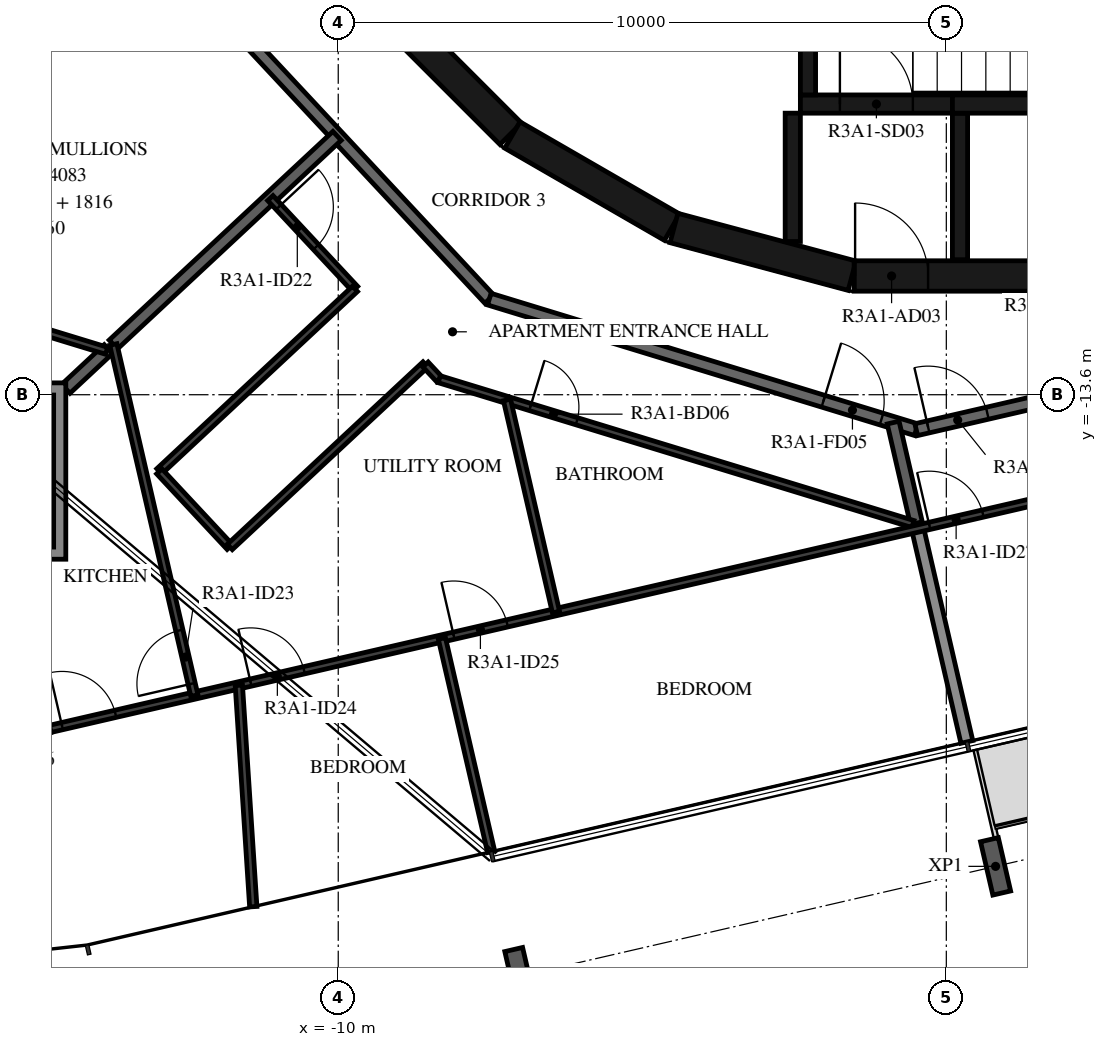
"""IFC4 building model, lengths in metres.
Left out: names, types, materials, properties, quantities, classifications, styles, units other than length and angle.
Written with IfcOpenShell. Run it as: python <this file> out.ifc"""

import sys

from ifc_helpers import new_model, si_unit, direction, frame, frame_2d, origin, origin_2d, place, context, subcontext, project, spatial, polyline, rectangle, i_section, outline, extrude, element, fill, save


model = new_model("IFC4")
c1 = context("Model", 3, precision=1e-05, world=origin(), true_north=direction((0.0, 1.0)))
c2 = subcontext(c1, "Body", "Model", "MODEL_VIEW")
j1 = project(units=[si_unit("LENGTHUNIT", "METRE"), si_unit("PLANEANGLEUNIT", "RADIAN")], contexts=[c1])
p1 = place(None, origin())
s1 = spatial("IfcSite", under=j1, at=p1, CompositionType="ELEMENT")
p2 = place(p1, origin())
s2 = spatial("IfcBuilding", under=s1, at=p2, CompositionType="ELEMENT")
p3 = place(p2, frame((0.0, 0.0, 116.9)))
s3 = spatial("IfcBuildingStorey", under=s2, at=p3, CompositionType="ELEMENT", Elevation=116.9)
for number, where, z_axis, x_axis in (
    (1, (-7.013, -23.162, -0.38), (0.0, 0.0, 1.0), (-0.974, -0.225, 0.0)),
    (2, (0.81, -21.356, -0.38), (0.0, 0.0, 1.0), (-0.974, -0.225, 0.0)),
):
    element("IfcColumn", number, at=place(p3, frame(where, z_axis=z_axis, x_axis=x_axis)), inside=s3, PredefinedType="COLUMN", context=c2, shape_type="SweptSolid", body=[
        extrude(i_section(OverallWidth=0.3, OverallDepth=0.9, WebThickness=0.019, FlangeThickness=0.035, FilletRadius=0.03, at=origin_2d()), origin(), (0.0, 0.0, 1.0), 3.5),
    ])
p4 = place(p3, frame((-9.308, -7.164, 0.0), z_axis=(0.0, 0.0, 1.0), x_axis=(0.707106781187, -0.707106781187, 0.0)))
e3 = element("IfcWall", 3, at=p4, inside=s3, PredefinedType="SHEAR", context=c2, shape_type="SweptSolid", body=[
    extrude(rectangle(XDim=3.032, YDim=0.5, at=frame_2d((1.516, 0.0))), origin(), (0.0, 0.0, 1.0), 3.12),
])
for number, where, z_axis, x_axis in (
    (4, (-7.137, -9.329, 0.0), (0.0, 0.0, 1.0), (0.866, -0.5, 0.0)),
    (5, (-4.479, -10.858, 0.0), (0.0, 0.0, 1.0), (0.966, -0.259, 0.0)),
):
    element("IfcWall", number, at=place(p3, frame(where, z_axis=z_axis, x_axis=x_axis)), inside=s3, PredefinedType="SHEAR", context=c2, shape_type="SweptSolid", body=[
        extrude(rectangle(XDim=3.033, YDim=0.5, at=frame_2d((1.516, 0.0))), origin(), (0.0, 0.0, 1.0), 3.12),
    ])
p5 = place(p3, frame((-1.516, -11.647, 0.0), z_axis=(0.0, 0.0, 1.0), x_axis=(1.0, 0.0, 0.0)))
e6 = element("IfcWall", 6, at=p5, inside=s3, PredefinedType="SHEAR", context=c2, shape_type="SweptSolid", body=[
    extrude(rectangle(XDim=3.033, YDim=0.5, at=frame_2d((1.516, 0.0))), origin(), (0.0, 0.0, 1.0), 3.12),
])
p6 = place(p5, frame((0.016, 0.0, 0.0)))
e7 = element("IfcOpeningElement", 7, at=p6, cuts=e6, PredefinedType="OPENING", context=c2, shape_type="SweptSolid", body=[
    extrude(rectangle(XDim=1.2, YDim=2.1, at=frame_2d((0.6, 1.05))), frame((0.0, 0.26, 0.0), z_axis=(0.0, -1.0, 0.0), x_axis=(1.0, 0.0, 0.0)), (0.0, 0.0, 1.0), 0.52),
])
p7 = place(p3, frame((-2.275, -8.67, 0.0), z_axis=(0.0, 0.0, 1.0), x_axis=(0.0, 1.0, 0.0)))
e8 = element("IfcWall", 8, at=p7, inside=s3, PredefinedType="SHEAR", context=c2, shape_type="SweptSolid", body=[
    extrude(rectangle(XDim=3.32, YDim=0.25, at=frame_2d((1.66, 0.0))), origin(), (0.0, 0.0, 1.0), 3.12),
])
p8 = place(p3, frame((0.1, -8.82, 0.0), z_axis=(0.0, 0.0, 1.0), x_axis=(1.0, 0.0, 0.0)))
e9 = element("IfcWall", 9, at=p8, inside=s3, PredefinedType="SHEAR", context=c2, shape_type="SweptSolid", body=[
    extrude(rectangle(XDim=4.55, YDim=0.3, at=frame_2d((2.275, 0.0))), origin(), (0.0, 0.0, 1.0), 3.12),
])
p9 = place(p3, frame((-2.4, -8.82, 0.0), z_axis=(0.0, 0.0, 1.0), x_axis=(1.0, 0.0, 0.0)))
e10 = element("IfcWall", 10, at=p9, inside=s3, PredefinedType="SHEAR", context=c2, shape_type="SweptSolid", body=[
    extrude(rectangle(XDim=2.5, YDim=0.3, at=frame_2d((1.25, 0.0))), origin(), (0.0, 0.0, 1.0), 3.12),
])
p10 = place(p9, frame((0.65, 0.0, 0.0)))
e11 = element("IfcOpeningElement", 11, at=p10, cuts=e10, PredefinedType="OPENING", context=c2, shape_type="SweptSolid", body=[
    extrude(rectangle(XDim=1.2, YDim=2.1, at=frame_2d((0.6, 1.05))), frame((0.0, 0.16, 0.0), z_axis=(0.0, -1.0, 0.0), x_axis=(1.0, 0.0, 0.0)), (0.0, 0.0, 1.0), 0.32),
])
p11 = place(p3, frame((-2.525, -8.97, 0.0), z_axis=(0.0, 0.0, 1.0), x_axis=(0.0, -1.0, 0.0)))
e12 = element("IfcWall", 12, at=p11, inside=s3, PredefinedType="SHEAR", context=c2, shape_type="SweptSolid", body=[
    extrude(rectangle(XDim=2.11, YDim=0.25, at=frame_2d((1.055, 0.0))), origin(), (0.0, 0.0, 1.0), 3.12),
])
p12 = place(p3, frame((0.225, -8.97, 0.0), z_axis=(0.0, 0.0, 1.0), x_axis=(0.0, -1.0, 0.0)))
e13 = element("IfcWall", 13, at=p12, inside=s3, PredefinedType="SHEAR", context=c2, shape_type="SweptSolid", body=[
    extrude(rectangle(XDim=2.41, YDim=0.25, at=frame_2d((1.205, 0.0))), origin(), (0.0, 0.0, 1.0), 3.12),
])
p13 = place(p3, frame((-12.523, -6.659, 0.0), z_axis=(0.0, 0.0, 1.0), x_axis=(0.682001841105, -0.731350455479, 0.0)))
e14 = element("IfcWall", 14, at=p13, inside=s3, PredefinedType="STANDARD", context=c2, shape_type="SweptSolid", body=[
    extrude(rectangle(XDim=7.342, YDim=0.2, at=frame_2d((3.671, 0.0))), origin(), (0.0, 0.0, 1.0), 3.12),
])
p14 = place(p3, frame((-7.516, -12.028, 0.0), z_axis=(0.0, 0.0, 1.0), x_axis=(0.956306642771, -0.292365533182, 0.0)))
e15 = element("IfcWall", 15, at=p14, inside=s3, PredefinedType="STANDARD", context=c2, shape_type="SweptSolid", body=[
    extrude(rectangle(XDim=7.342, YDim=0.2, at=frame_2d((3.671, 0.0))), origin(), (0.0, 0.0, 1.0), 3.12),
])
p15 = place(p14, frame((5.745, 0.0, 0.0)))
e16 = element("IfcOpeningElement", 16, at=p15, cuts=e15, PredefinedType="OPENING", context=c2, shape_type="SweptSolid", body=[
    extrude(rectangle(XDim=1.0, YDim=2.1, at=frame_2d((0.5, 1.05))), frame((0.0, 0.11, 0.0), z_axis=(0.0, -1.0, 0.0), x_axis=(1.0, 0.0, 0.0)), (0.0, 0.0, 1.0), 0.22),
])
p16 = place(p3, frame((-0.495, -14.175, 0.0), z_axis=(0.0, 0.0, 1.0), x_axis=(0.974376622151, 0.224922649383, 0.0)))
e17 = element("IfcWall", 17, at=p16, inside=s3, PredefinedType="STANDARD", context=c2, shape_type="SweptSolid", body=[
    extrude(rectangle(XDim=7.342, YDim=0.2, at=frame_2d((3.671, 0.0))), origin(), (0.0, 0.0, 1.0), 3.12),
])
p17 = place(p16, frame((0.2, 0.0, 0.0)))
e18 = element("IfcOpeningElement", 18, at=p17, cuts=e17, PredefinedType="OPENING", context=c2, shape_type="SweptSolid", body=[
    extrude(rectangle(XDim=1.0, YDim=2.1, at=frame_2d((0.5, 1.05))), frame((0.0, 0.11, 0.0), z_axis=(0.0, -1.0, 0.0), x_axis=(1.0, 0.0, 0.0)), (0.0, 0.0, 1.0), 0.22),
])
p18 = place(p3, frame((-13.699, -12.774, 0.0), z_axis=(0.0, 0.0, 1.0), x_axis=(0.731353758457, 0.681998299111, 0.0)))
e19 = element("IfcWall", 19, at=p18, inside=s3, PredefinedType="STANDARD", context=c2, shape_type="SweptSolid", body=[
    extrude(rectangle(XDim=5.031, YDim=0.2, at=frame_2d((2.515, 0.0))), origin(), (0.0, 0.0, 1.0), 3.12),
])
p19 = place(p3, frame((-14.48, -13.503, 0.0), z_axis=(0.0, 0.0, 1.0), x_axis=(0.73152991834, 0.681809341806, 0.0)))
e20 = element("IfcWall", 20, at=p19, inside=s3, PredefinedType="STANDARD", context=c2, shape_type="SweptSolid", body=[
    extrude(rectangle(XDim=0.958, YDim=0.2, at=frame_2d((0.479, 0.0))), origin(), (0.0, 0.0, 1.0), 3.12),
])
p20 = place(p3, frame((-0.492, -15.713, 0.0), z_axis=(0.0, 0.0, 1.0), x_axis=(-0.224974992875, 0.97436453783, 0.0)))
e21 = element("IfcWall", 21, at=p20, inside=s3, PredefinedType="STANDARD", context=c2, shape_type="SweptSolid", body=[
    extrude(rectangle(XDim=1.698, YDim=0.2, at=frame_2d((0.849, 0.0))), origin(), (0.0, 0.0, 1.0), 3.12),
])
p21 = place(p3, frame((0.338, -19.31, 0.0), z_axis=(0.0, 0.0, 1.0), x_axis=(-0.224943703639, 0.9743717618, 0.0)))
e22 = element("IfcWall", 22, at=p21, inside=s3, PredefinedType="STANDARD", context=c2, shape_type="SweptSolid", body=[
    extrude(rectangle(XDim=3.6, YDim=0.2, at=frame_2d((1.8, 0.0))), origin(), (0.0, 0.0, 1.0), 2.73),
])
p22 = place(p3, frame((-19.404, -11.167, 0.0), z_axis=(0.0, 0.0, 1.0), x_axis=(0.956314306829, -0.292340463423, 0.0)))
e23 = element("IfcWall", 23, at=p22, inside=s3, PredefinedType="PARTITIONING", context=c2, shape_type="SweptSolid", body=[
    extrude(rectangle(XDim=5.85, YDim=0.12, at=frame_2d((2.925, 0.0))), origin(), (0.0, 0.0, 1.0), 3.12),
])
p23 = place(p22, frame((0.3, 0.0, 0.0)))
e24 = element("IfcOpeningElement", 24, at=p23, cuts=e23, PredefinedType="OPENING", context=c2, shape_type="SweptSolid", body=[
    extrude(rectangle(XDim=0.9, YDim=2.1, at=frame_2d((0.45, 1.05))), frame((0.0, 0.07, 0.0), z_axis=(0.0, -1.0, 0.0), x_axis=(1.0, 0.0, 0.0)), (0.0, 0.0, 1.0), 0.14),
])
p24 = place(p3, frame((-11.117, -10.366, 0.0), z_axis=(0.0, 0.0, 1.0), x_axis=(0.682041233274, -0.731313719353, 0.0)))
e25 = element("IfcWall", 25, at=p24, inside=s3, PredefinedType="PARTITIONING", context=c2, shape_type="SweptSolid", body=[
    extrude(rectangle(XDim=2.042, YDim=0.12, at=frame_2d((1.021, 0.0))), origin(), (0.0, 0.0, 1.0), 3.12),
])
p25 = place(p24, frame((0.2, 0.0, 0.0)))
e26 = element("IfcOpeningElement", 26, at=p25, cuts=e25, PredefinedType="OPENING", context=c2, shape_type="SweptSolid", body=[
    extrude(rectangle(XDim=0.9, YDim=2.1, at=frame_2d((0.45, 1.05))), frame((0.0, 0.07, 0.0), z_axis=(0.0, -1.0, 0.0), x_axis=(1.0, 0.0, 0.0)), (0.0, 0.0, 1.0), 0.14),
])
p26 = place(p3, frame((-9.724, -11.859, 0.0), z_axis=(0.0, 0.0, 1.0), x_axis=(-0.731365154613, -0.681986078023, 0.0)))
e27 = element("IfcWall", 27, at=p26, inside=s3, PredefinedType="PARTITIONING", context=c2, shape_type="SweptSolid", body=[
    extrude(rectangle(XDim=4.4, YDim=0.12, at=frame_2d((2.2, 0.0))), origin(), (0.0, 0.0, 1.0), 3.12),
])
p27 = place(p3, frame((-12.943, -14.86, 0.0), z_axis=(0.0, 0.0, 1.0), x_axis=(0.682046998737, -0.731308342297, 0.0)))
e28 = element("IfcWall", 28, at=p27, inside=s3, PredefinedType="PARTITIONING", context=c2, shape_type="SweptSolid", body=[
    extrude(rectangle(XDim=1.7, YDim=0.12, at=frame_2d((0.85, 0.0))), origin(), (0.0, 0.0, 1.0), 3.12),
])
p28 = place(p3, frame((-11.783, -16.104, 0.0), z_axis=(0.0, 0.0, 1.0), x_axis=(0.731365154613, 0.681986078023, 0.0)))
e29 = element("IfcWall", 29, at=p28, inside=s3, PredefinedType="PARTITIONING", context=c2, shape_type="SweptSolid", body=[
    extrude(rectangle(XDim=4.4, YDim=0.12, at=frame_2d((2.2, 0.0))), origin(), (0.0, 0.0, 1.0), 3.12),
])
p29 = place(p3, frame((-8.565, -13.103, 0.0), z_axis=(0.0, 0.0, 1.0), x_axis=(0.681636048219, -0.731691395172, 0.0)))
e30 = element("IfcWall", 30, at=p29, inside=s3, PredefinedType="PARTITIONING", context=c2, shape_type="SweptSolid", body=[
    extrude(rectangle(XDim=0.332, YDim=0.12, at=frame_2d((0.166, 0.0))), origin(), (0.0, 0.0, 1.0), 3.12),
])
p30 = place(p3, frame((-8.339, -13.345, 0.0), z_axis=(0.0, 0.0, 1.0), x_axis=(0.956310145342, -0.292354076276, 0.0)))
e31 = element("IfcWall", 31, at=p30, inside=s3, PredefinedType="PARTITIONING", context=c2, shape_type="SweptSolid", body=[
    extrude(rectangle(XDim=8.146, YDim=0.12, at=frame_2d((4.073, 0.0))), origin(), (0.0, 0.0, 1.0), 3.12),
])
p31 = place(p30, frame((1.565, 0.0, 0.0)))
e32 = element("IfcOpeningElement", 32, at=p31, cuts=e31, PredefinedType="OPENING", context=c2, shape_type="SweptSolid", body=[
    extrude(rectangle(XDim=0.8, YDim=2.1, at=frame_2d((0.4, 1.05))), frame((0.0, 0.07, 0.0), z_axis=(0.0, -1.0, 0.0), x_axis=(1.0, 0.0, 0.0)), (0.0, 0.0, 1.0), 0.14),
])
p32 = place(p3, frame((-14.736, -19.095, 0.0), z_axis=(0.0, 0.0, 1.0), x_axis=(0.974369132722, 0.224955091516, 0.0)))
e33 = element("IfcWall", 33, at=p32, inside=s3, PredefinedType="PARTITIONING", context=c2, shape_type="SweptSolid", body=[
    extrude(rectangle(XDim=18.654, YDim=0.12, at=frame_2d((9.327, 0.0))), origin(), (0.0, 0.0, 1.0), 3.12),
])
p33 = place(p32, frame((3.383, 0.0, 0.0)))
e34 = element("IfcOpeningElement", 34, at=p33, cuts=e33, PredefinedType="OPENING", context=c2, shape_type="SweptSolid", body=[
    extrude(rectangle(XDim=0.9, YDim=2.1, at=frame_2d((0.45, 1.05))), frame((0.0, 0.07, 0.0), z_axis=(0.0, -1.0, 0.0), x_axis=(1.0, 0.0, 0.0)), (0.0, 0.0, 1.0), 0.14),
])
p34 = place(p32, frame((6.81, 0.0, 0.0)))
e35 = element("IfcOpeningElement", 35, at=p34, cuts=e33, PredefinedType="OPENING", context=c2, shape_type="SweptSolid", body=[
    extrude(rectangle(XDim=0.9, YDim=2.1, at=frame_2d((0.45, 1.05))), frame((0.0, 0.07, 0.0), z_axis=(0.0, -1.0, 0.0), x_axis=(1.0, 0.0, 0.0)), (0.0, 0.0, 1.0), 0.14),
])
p35 = place(p32, frame((0.2, 0.0, 0.0)))
e36 = element("IfcOpeningElement", 36, at=p35, cuts=e33, PredefinedType="OPENING", context=c2, shape_type="SweptSolid", body=[
    extrude(rectangle(XDim=0.9, YDim=2.1, at=frame_2d((0.45, 1.05))), frame((0.0, 0.07, 0.0), z_axis=(0.0, -1.0, 0.0), x_axis=(1.0, 0.0, 0.0)), (0.0, 0.0, 1.0), 0.14),
])
p36 = place(p32, frame((14.839, 0.0, 0.0)))
e37 = element("IfcOpeningElement", 37, at=p36, cuts=e33, PredefinedType="OPENING", context=c2, shape_type="SweptSolid", body=[
    extrude(rectangle(XDim=0.9, YDim=2.1, at=frame_2d((0.45, 1.05))), frame((0.0, 0.07, 0.0), z_axis=(0.0, -1.0, 0.0), x_axis=(1.0, 0.0, 0.0)), (0.0, 0.0, 1.0), 0.14),
])
p37 = place(p3, frame((-12.366, -18.548, 0.0), z_axis=(0.0, 0.0, 1.0), x_axis=(-0.224958805164, 0.974368275335, 0.0)))
e38 = element("IfcWall", 38, at=p37, inside=s3, PredefinedType="PARTITIONING", context=c2, shape_type="SweptSolid", body=[
    extrude(rectangle(XDim=5.926, YDim=0.12, at=frame_2d((2.963, 0.0))), origin(), (0.0, 0.0, 1.0), 3.12),
])
p38 = place(p37, frame((0.2, 0.0, 0.0)))
e39 = element("IfcOpeningElement", 39, at=p38, cuts=e38, PredefinedType="OPENING", context=c2, shape_type="SweptSolid", body=[
    extrude(rectangle(XDim=0.9, YDim=2.1, at=frame_2d((0.45, 1.05))), frame((0.0, 0.07, 0.0), z_axis=(0.0, -1.0, 0.0), x_axis=(1.0, 0.0, 0.0)), (0.0, 0.0, 1.0), 0.14),
])
p39 = place(p3, frame((-11.397, -22.019, 0.0), z_axis=(0.0, 0.0, 1.0), x_axis=(-0.065124052048, 0.997877175731, 0.0)))
e40 = element("IfcWall", 40, at=p39, inside=s3, PredefinedType="PARTITIONING", context=c2, shape_type="SweptSolid", body=[
    extrude(rectangle(XDim=3.648, YDim=0.12, at=frame_2d((1.824, 0.0))), origin(), (0.0, 0.0, 1.0), 3.12),
])
p40 = place(p3, frame((-6.419, -17.175, 0.0), z_axis=(0.0, 0.0, 1.0), x_axis=(-0.224979003559, 0.974363611778, 0.0)))
e41 = element("IfcWall", 41, at=p40, inside=s3, PredefinedType="PARTITIONING", context=c2, shape_type="SweptSolid", body=[
    extrude(rectangle(XDim=3.581, YDim=0.12, at=frame_2d((1.791, 0.0))), origin(), (0.0, 0.0, 1.0), 3.12),
])
p41 = place(p3, frame((-7.486, -21.116, 0.0), z_axis=(0.0, 0.0, 1.0), x_axis=(-0.224943703639, 0.9743717618, 0.0)))
e42 = element("IfcWall", 42, at=p41, inside=s3, PredefinedType="PARTITIONING", context=c2, shape_type="SweptSolid", body=[
    extrude(rectangle(XDim=3.6, YDim=0.12, at=frame_2d((1.8, 0.0))), origin(), (0.0, 0.0, 1.0), 2.73),
])
p42 = place(p3, origin())
e43 = element("IfcWall", 43, at=p42, inside=s3, PredefinedType="STANDARD", context=c2, shape_type="SweptSolid", body=[
    extrude(outline(polyline([(-14.48, -13.405), (-14.48, -16.305), (-17.38, -16.305), (-17.38, -13.405), (-14.48, -13.405)]), holes=[polyline([(-17.18, -16.105), (-14.68, -16.105), (-14.68, -13.605), (-17.18, -13.605), (-17.18, -16.105)])]), origin(), (0.0, 0.0, 1.0), 3.12),
])
p43 = place(p10, origin())
e44 = element("IfcDoor", 44, at=p43, inside=s3, OperationType="SINGLE_SWING_LEFT", PredefinedType="DOOR", context=c2, shape_type="SweptSolid", body=[
    extrude(rectangle(XDim=1.2, YDim=2.1, at=frame_2d((0.6, 1.05))), frame((0.0, 0.025, 0.0), z_axis=(0.0, -1.0, 0.0), x_axis=(1.0, 0.0, 0.0)), (0.0, 0.0, 1.0), 0.05),
])
fill(e11, e44)
p44 = place(p6, origin())
e45 = element("IfcDoor", 45, at=p44, inside=s3, OperationType="SINGLE_SWING_RIGHT", PredefinedType="DOOR", context=c2, shape_type="SweptSolid", body=[
    extrude(rectangle(XDim=1.2, YDim=2.1, at=frame_2d((0.6, 1.05))), frame((0.0, 0.025, 0.0), z_axis=(0.0, -1.0, 0.0), x_axis=(1.0, 0.0, 0.0)), (0.0, 0.0, 1.0), 0.05),
])
fill(e7, e45)
p45 = place(p15, origin())
e46 = element("IfcDoor", 46, at=p45, inside=s3, OperationType="SINGLE_SWING_LEFT", PredefinedType="DOOR", context=c2, shape_type="SweptSolid", body=[
    extrude(rectangle(XDim=1.0, YDim=2.1, at=frame_2d((0.5, 1.05))), frame((0.0, 0.025, 0.0), z_axis=(0.0, -1.0, 0.0), x_axis=(1.0, 0.0, 0.0)), (0.0, 0.0, 1.0), 0.05),
])
fill(e16, e46)
p46 = place(p25, origin())
e47 = element("IfcDoor", 47, at=p46, inside=s3, OperationType="SINGLE_SWING_LEFT", PredefinedType="DOOR", context=c2, shape_type="SweptSolid", body=[
    extrude(rectangle(XDim=0.9, YDim=2.1, at=frame_2d((0.45, 1.05))), frame((0.0, 0.025, 0.0), z_axis=(0.0, -1.0, 0.0), x_axis=(1.0, 0.0, 0.0)), (0.0, 0.0, 1.0), 0.05),
])
fill(e26, e47)
p47 = place(p31, origin())
e48 = element("IfcDoor", 48, at=p47, inside=s3, OperationType="SINGLE_SWING_LEFT", PredefinedType="DOOR", context=c2, shape_type="SweptSolid", body=[
    extrude(rectangle(XDim=0.8, YDim=2.1, at=frame_2d((0.4, 1.05))), frame((0.0, 0.025, 0.0), z_axis=(0.0, -1.0, 0.0), x_axis=(1.0, 0.0, 0.0)), (0.0, 0.0, 1.0), 0.05),
])
fill(e32, e48)
p48 = place(p38, origin())
e49 = element("IfcDoor", 49, at=p48, inside=s3, OperationType="SINGLE_SWING_LEFT", PredefinedType="DOOR", context=c2, shape_type="SweptSolid", body=[
    extrude(rectangle(XDim=0.9, YDim=2.1, at=frame_2d((0.45, 1.05))), frame((0.0, 0.025, 0.0), z_axis=(0.0, -1.0, 0.0), x_axis=(1.0, 0.0, 0.0)), (0.0, 0.0, 1.0), 0.05),
])
fill(e39, e49)
p49 = place(p33, origin())
e50 = element("IfcDoor", 50, at=p49, inside=s3, OperationType="SINGLE_SWING_LEFT", PredefinedType="DOOR", context=c2, shape_type="SweptSolid", body=[
    extrude(rectangle(XDim=0.9, YDim=2.1, at=frame_2d((0.45, 1.05))), frame((0.0, 0.025, 0.0), z_axis=(0.0, -1.0, 0.0), x_axis=(1.0, 0.0, 0.0)), (0.0, 0.0, 1.0), 0.05),
])
fill(e34, e50)
p50 = place(p34, origin())
e51 = element("IfcDoor", 51, at=p50, inside=s3, OperationType="SINGLE_SWING_LEFT", PredefinedType="DOOR", context=c2, shape_type="SweptSolid", body=[
    extrude(rectangle(XDim=0.9, YDim=2.1, at=frame_2d((0.45, 1.05))), frame((0.0, 0.025, 0.0), z_axis=(0.0, -1.0, 0.0), x_axis=(1.0, 0.0, 0.0)), (0.0, 0.0, 1.0), 0.05),
])
fill(e35, e51)
p51 = place(p35, origin())
e52 = element("IfcDoor", 52, at=p51, inside=s3, OperationType="SINGLE_SWING_RIGHT", PredefinedType="DOOR", context=c2, shape_type="SweptSolid", body=[
    extrude(rectangle(XDim=0.9, YDim=2.1, at=frame_2d((0.45, 1.05))), frame((0.0, 0.025, 0.0), z_axis=(0.0, -1.0, 0.0), x_axis=(1.0, 0.0, 0.0)), (0.0, 0.0, 1.0), 0.05),
])
fill(e36, e52)
p52 = place(p17, origin())
e53 = element("IfcDoor", 53, at=p52, inside=s3, OperationType="SINGLE_SWING_LEFT", PredefinedType="DOOR", context=c2, shape_type="SweptSolid", body=[
    extrude(rectangle(XDim=1.0, YDim=2.1, at=frame_2d((0.5, 1.05))), frame((0.0, 0.025, 0.0), z_axis=(0.0, -1.0, 0.0), x_axis=(1.0, 0.0, 0.0)), (0.0, 0.0, 1.0), 0.05),
])
fill(e18, e53)
p53 = place(p36, origin())
e54 = element("IfcDoor", 54, at=p53, inside=s3, OperationType="SINGLE_SWING_LEFT", PredefinedType="DOOR", context=c2, shape_type="SweptSolid", body=[
    extrude(rectangle(XDim=0.9, YDim=2.1, at=frame_2d((0.45, 1.05))), frame((0.0, 0.025, 0.0), z_axis=(0.0, -1.0, 0.0), x_axis=(1.0, 0.0, 0.0)), (0.0, 0.0, 1.0), 0.05),
])
fill(e37, e54)
save(model, sys.argv[1])
